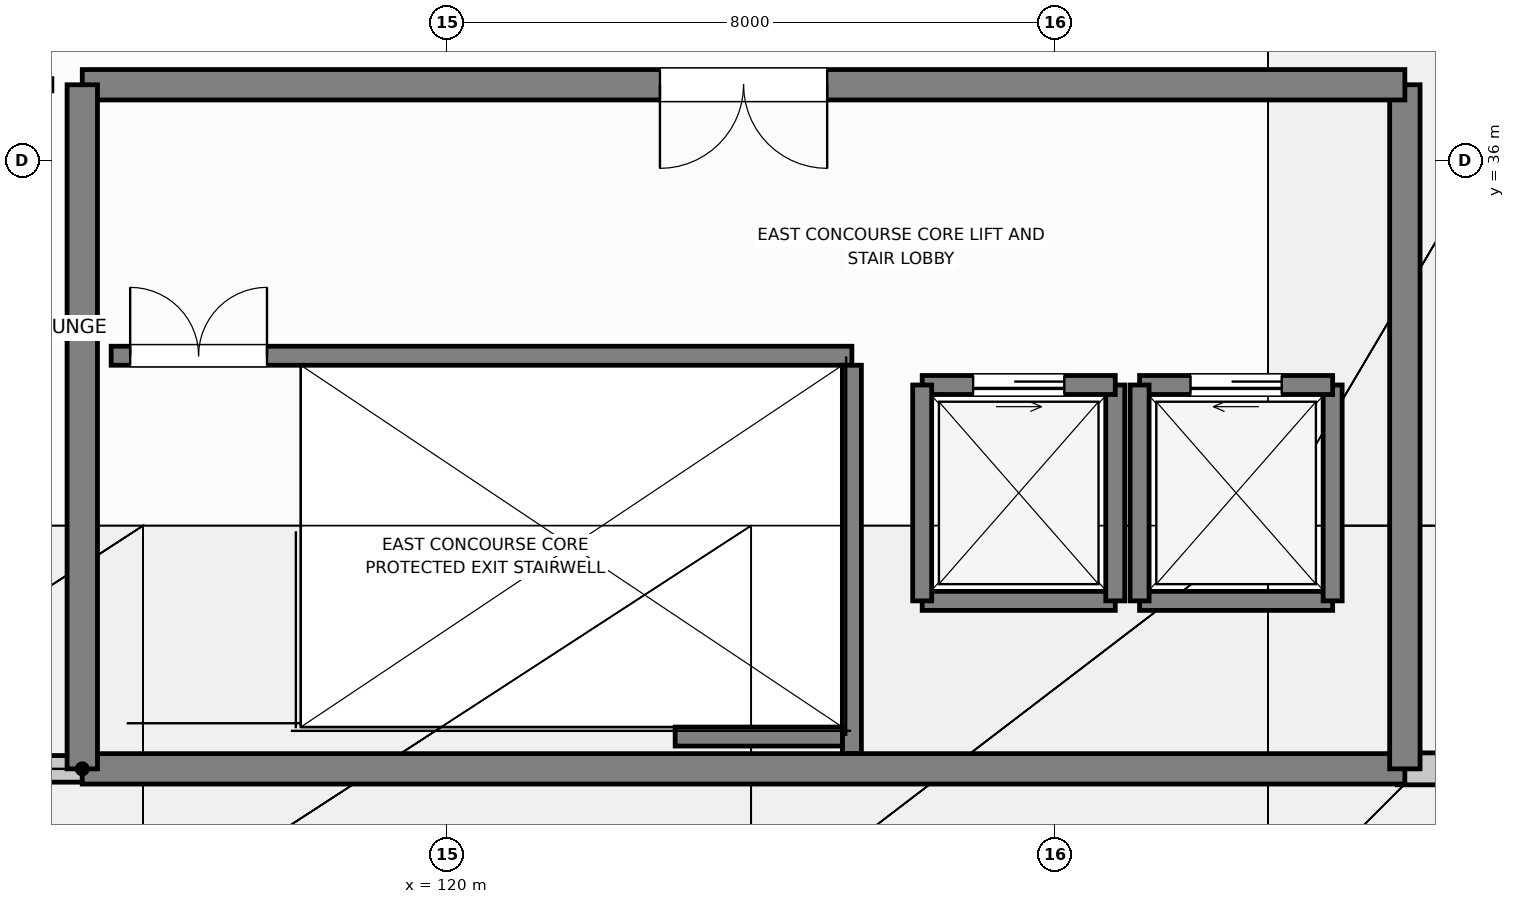
"""IFC4 building model, lengths in metres.
Left out: names, types, materials, properties, quantities, classifications, styles, units other than length and angle.
Written with IfcOpenShell. Run it as: python <this file> out.ifc"""

import sys

from ifc_helpers import new_model, si_unit, direction, frame, frame_2d, origin, place, context, subcontext, project, spatial, rectangle, extrude, element, fill, save


model = new_model("IFC4")
c1 = context("Model", 3, precision=1e-05, world=origin(), true_north=direction((0.0, 1.0)))
c2 = subcontext(c1, "Body", "Model", "MODEL_VIEW")
j1 = project(units=[si_unit("LENGTHUNIT", "METRE"), si_unit("PLANEANGLEUNIT", "RADIAN")], contexts=[c1])
p1 = place(None, origin())
s1 = spatial("IfcSite", under=j1, at=p1, CompositionType="ELEMENT")
p2 = place(p1, origin())
s2 = spatial("IfcBuilding", under=s1, at=p2, CompositionType="ELEMENT")
p3 = place(p2, frame((0.0, 0.0, 11.4)))
s3 = spatial("IfcBuildingStorey", under=s2, at=p3, CompositionType="ELEMENT", Elevation=11.4)
p4 = place(p3, frame((107.5, 28.0, 0.0), z_axis=(0.0, 0.0, 1.0), x_axis=(1.0, 0.0, 0.0)))
e1 = element("IfcWall", 1, at=p4, inside=s3, PredefinedType="STANDARD", context=c2, shape_type="SweptSolid", body=[
    extrude(rectangle(XDim=7.7, YDim=0.35, at=frame_2d((3.85, 0.0))), origin(), (0.0, 0.0, 1.0), 0.95),
])
p5 = place(p3, frame((132.5, 28.0, 0.0), z_axis=(0.0, 0.0, 1.0), x_axis=(1.0, 0.0, 0.0)))
e2 = element("IfcWall", 2, at=p5, inside=s3, PredefinedType="STANDARD", context=c2, shape_type="SweptSolid", body=[
    extrude(rectangle(XDim=1.7, YDim=0.42, at=frame_2d((0.85, 0.0))), origin(), (0.0, 0.0, 1.0), 4.4),
])
p6 = place(p3, frame((126.25, 30.21, 0.0), z_axis=(0.0, 0.0, 1.0), x_axis=(1.0, 0.0, 0.0)))
e3 = element("IfcWall", 3, at=p6, inside=s3, PredefinedType="SOLIDWALL", context=c2, shape_type="SweptSolid", body=[
    extrude(rectangle(XDim=2.54, YDim=0.25, at=frame_2d((1.27, 0.0))), origin(), (0.0, 0.0, 1.0), 4.46),
])
p7 = place(p3, frame((128.79, 30.21, 0.0), z_axis=(0.0, 0.0, 1.0), x_axis=(0.0, 1.0, 0.0)))
e4 = element("IfcWall", 4, at=p7, inside=s3, PredefinedType="SOLIDWALL", context=c2, shape_type="SweptSolid", body=[
    extrude(rectangle(XDim=2.84, YDim=0.25, at=frame_2d((1.42, 0.0))), origin(), (0.0, 0.0, 1.0), 4.46),
])
p8 = place(p3, frame((128.79, 33.05, 0.0), z_axis=(0.0, 0.0, 1.0), x_axis=(-1.0, 0.0, 0.0)))
e5 = element("IfcWall", 5, at=p8, inside=s3, PredefinedType="SOLIDWALL", context=c2, shape_type="SweptSolid", body=[
    extrude(rectangle(XDim=2.54, YDim=0.25, at=frame_2d((1.27, 0.0))), origin(), (0.0, 0.0, 1.0), 4.46),
])
p9 = place(p8, frame((0.67, 0.0, 0.0)))
e6 = element("IfcOpeningElement", 6, at=p9, cuts=e5, PredefinedType="OPENING", context=c2, shape_type="SweptSolid", body=[
    extrude(rectangle(XDim=1.2, YDim=2.2, at=frame_2d((0.6, 1.1))), frame((0.0, 0.135, 0.0), z_axis=(0.0, -1.0, 0.0), x_axis=(1.0, 0.0, 0.0)), (0.0, 0.0, 1.0), 0.27),
])
p10 = place(p3, frame((126.25, 33.05, 0.0), z_axis=(0.0, 0.0, 1.0), x_axis=(0.0, -1.0, 0.0)))
e7 = element("IfcWall", 7, at=p10, inside=s3, PredefinedType="SOLIDWALL", context=c2, shape_type="SweptSolid", body=[
    extrude(rectangle(XDim=2.84, YDim=0.25, at=frame_2d((1.42, 0.0))), origin(), (0.0, 0.0, 1.0), 4.46),
])
p11 = place(p3, frame((129.11, 30.21, 0.0), z_axis=(0.0, 0.0, 1.0), x_axis=(1.0, 0.0, 0.0)))
e8 = element("IfcWall", 8, at=p11, inside=s3, PredefinedType="SOLIDWALL", context=c2, shape_type="SweptSolid", body=[
    extrude(rectangle(XDim=2.54, YDim=0.25, at=frame_2d((1.27, 0.0))), origin(), (0.0, 0.0, 1.0), 4.46),
])
p12 = place(p3, frame((131.65, 30.21, 0.0), z_axis=(0.0, 0.0, 1.0), x_axis=(0.0, 1.0, 0.0)))
e9 = element("IfcWall", 9, at=p12, inside=s3, PredefinedType="SOLIDWALL", context=c2, shape_type="SweptSolid", body=[
    extrude(rectangle(XDim=2.84, YDim=0.25, at=frame_2d((1.42, 0.0))), origin(), (0.0, 0.0, 1.0), 4.46),
])
p13 = place(p3, frame((131.65, 33.05, 0.0), z_axis=(0.0, 0.0, 1.0), x_axis=(-1.0, 0.0, 0.0)))
e10 = element("IfcWall", 10, at=p13, inside=s3, PredefinedType="SOLIDWALL", context=c2, shape_type="SweptSolid", body=[
    extrude(rectangle(XDim=2.54, YDim=0.25, at=frame_2d((1.27, 0.0))), origin(), (0.0, 0.0, 1.0), 4.46),
])
p14 = place(p13, frame((0.67, 0.0, 0.0)))
e11 = element("IfcOpeningElement", 11, at=p14, cuts=e10, PredefinedType="OPENING", context=c2, shape_type="SweptSolid", body=[
    extrude(rectangle(XDim=1.2, YDim=2.2, at=frame_2d((0.6, 1.1))), frame((0.0, 0.135, 0.0), z_axis=(0.0, -1.0, 0.0), x_axis=(1.0, 0.0, 0.0)), (0.0, 0.0, 1.0), 0.27),
])
p15 = place(p3, frame((129.11, 33.05, 0.0), z_axis=(0.0, 0.0, 1.0), x_axis=(0.0, -1.0, 0.0)))
e12 = element("IfcWall", 12, at=p15, inside=s3, PredefinedType="SOLIDWALL", context=c2, shape_type="SweptSolid", body=[
    extrude(rectangle(XDim=2.84, YDim=0.25, at=frame_2d((1.42, 0.0))), origin(), (0.0, 0.0, 1.0), 4.46),
])
p16 = place(p3, frame((115.58, 33.435, 0.0), z_axis=(0.0, 0.0, 1.0), x_axis=(1.0, 0.0, 0.0)))
e13 = element("IfcWall", 13, at=p16, inside=s3, PredefinedType="SOLIDWALL", context=c2, shape_type="SweptSolid", body=[
    extrude(rectangle(XDim=9.745, YDim=0.25, at=frame_2d((4.872, 0.0))), origin(), (0.0, 0.0, 1.0), 4.46),
])
p17 = place(p16, frame((0.25, 0.0, 0.0)))
e14 = element("IfcOpeningElement", 14, at=p17, cuts=e13, PredefinedType="OPENING", context=c2, shape_type="SweptSolid", body=[
    extrude(rectangle(XDim=1.8, YDim=2.25, at=frame_2d((0.9, 1.125))), frame((0.0, 0.135, 0.0), z_axis=(0.0, -1.0, 0.0), x_axis=(1.0, 0.0, 0.0)), (0.0, 0.0, 1.0), 0.27),
])
p18 = place(p3, frame((125.325, 28.2, 0.0), z_axis=(0.0, 0.0, 1.0), x_axis=(0.0, 1.0, 0.0)))
e15 = element("IfcWall", 15, at=p18, inside=s3, PredefinedType="SOLIDWALL", context=c2, shape_type="SweptSolid", body=[
    extrude(rectangle(XDim=5.11, YDim=0.25, at=frame_2d((2.555, 0.0))), origin(), (0.0, 0.0, 1.0), 4.46),
])
p19 = place(p3, frame((123.0, 28.425, 0.0), z_axis=(0.0, 0.0, 1.0), x_axis=(1.0, 0.0, 0.0)))
e16 = element("IfcWall", 16, at=p19, inside=s3, PredefinedType="SOLIDWALL", context=c2, shape_type="SweptSolid", body=[
    extrude(rectangle(XDim=2.2, YDim=0.25, at=frame_2d((1.1, 0.0))), origin(), (0.0, 0.0, 1.0), 4.46),
])
p20 = place(p3, frame((115.2, 28.0, 0.0), z_axis=(0.0, 0.0, 1.0), x_axis=(1.0, 0.0, 0.0)))
e17 = element("IfcWall", 17, at=p20, inside=s3, PredefinedType="SHEAR", context=c2, shape_type="SweptSolid", body=[
    extrude(rectangle(XDim=17.4, YDim=0.4, at=frame_2d((8.7, 0.0))), origin(), (0.0, 0.0, 1.0), 4.46),
])
p21 = place(p3, frame((132.6, 28.0, 0.0), z_axis=(0.0, 0.0, 1.0), x_axis=(0.0, 1.0, 0.0)))
e18 = element("IfcWall", 18, at=p21, inside=s3, PredefinedType="SHEAR", context=c2, shape_type="SweptSolid", body=[
    extrude(rectangle(XDim=9.0, YDim=0.4, at=frame_2d((4.5, 0.0))), origin(), (0.0, 0.0, 1.0), 4.46),
])
p22 = place(p3, frame((132.6, 37.0, 0.0), z_axis=(0.0, 0.0, 1.0), x_axis=(-1.0, 0.0, 0.0)))
e19 = element("IfcWall", 19, at=p22, inside=s3, PredefinedType="SHEAR", context=c2, shape_type="SweptSolid", body=[
    extrude(rectangle(XDim=17.4, YDim=0.4, at=frame_2d((8.7, 0.0))), origin(), (0.0, 0.0, 1.0), 4.46),
])
p23 = place(p22, frame((7.6, 0.0, 0.0)))
e20 = element("IfcOpeningElement", 20, at=p23, cuts=e19, PredefinedType="OPENING", context=c2, shape_type="SweptSolid", body=[
    extrude(rectangle(XDim=2.2, YDim=2.3, at=frame_2d((1.1, 1.15))), frame((0.0, 0.21, 0.0), z_axis=(0.0, -1.0, 0.0), x_axis=(1.0, 0.0, 0.0)), (0.0, 0.0, 1.0), 0.42),
])
p24 = place(p3, frame((115.2, 37.0, 0.0), z_axis=(0.0, 0.0, 1.0), x_axis=(0.0, -1.0, 0.0)))
e21 = element("IfcWall", 21, at=p24, inside=s3, PredefinedType="SHEAR", context=c2, shape_type="SweptSolid", body=[
    extrude(rectangle(XDim=9.0, YDim=0.4, at=frame_2d((4.5, 0.0))), origin(), (0.0, 0.0, 1.0), 4.46),
])
p25 = place(p3, frame((69.2, 37.0, 0.0), z_axis=(0.0, 0.0, 1.0), x_axis=(1.0, 0.0, 0.0)))
e22 = element("IfcWall", 22, at=p25, inside=s3, PredefinedType="PARTITIONING", context=c2, shape_type="SweptSolid", body=[
    extrude(rectangle(XDim=45.6, YDim=0.16, at=frame_2d((22.8, 0.0))), origin(), (0.0, 0.0, 1.0), 4.46),
])
p26 = place(p25, frame((21.9, 0.0, 0.0)))
e23 = element("IfcOpeningElement", 23, at=p26, cuts=e22, PredefinedType="OPENING", context=c2, shape_type="SweptSolid", body=[
    extrude(rectangle(XDim=1.8, YDim=2.25, at=frame_2d((0.9, 1.125))), frame((0.0, 0.09, 0.0), z_axis=(0.0, -1.0, 0.0), x_axis=(1.0, 0.0, 0.0)), (0.0, 0.0, 1.0), 0.18),
])
p27 = place(p9, origin())
e24 = element("IfcDoor", 24, at=p27, inside=s3, OperationType="SLIDING_TO_LEFT", PredefinedType="DOOR", context=c2, shape_type="SweptSolid", body=[
    extrude(rectangle(XDim=1.2, YDim=2.2, at=frame_2d((0.6, 1.1))), frame((0.0, 0.025, 0.0), z_axis=(0.0, -1.0, 0.0), x_axis=(1.0, 0.0, 0.0)), (0.0, 0.0, 1.0), 0.05),
])
fill(e6, e24)
p28 = place(p14, origin())
e25 = element("IfcDoor", 25, at=p28, inside=s3, OperationType="SLIDING_TO_RIGHT", PredefinedType="DOOR", context=c2, shape_type="SweptSolid", body=[
    extrude(rectangle(XDim=1.2, YDim=2.2, at=frame_2d((0.6, 1.1))), frame((0.0, 0.025, 0.0), z_axis=(0.0, -1.0, 0.0), x_axis=(1.0, 0.0, 0.0)), (0.0, 0.0, 1.0), 0.05),
])
fill(e11, e25)
p29 = place(p17, origin())
e26 = element("IfcDoor", 26, at=p29, inside=s3, OperationType="DOUBLE_DOOR_SINGLE_SWING", PredefinedType="DOOR", context=c2, shape_type="SweptSolid", body=[
    extrude(rectangle(XDim=1.8, YDim=2.25, at=frame_2d((0.9, 1.125))), frame((0.0, 0.025, 0.0), z_axis=(0.0, -1.0, 0.0), x_axis=(1.0, 0.0, 0.0)), (0.0, 0.0, 1.0), 0.05),
])
fill(e14, e26)
p30 = place(p23, origin())
e27 = element("IfcDoor", 27, at=p30, inside=s3, OperationType="DOUBLE_DOOR_SINGLE_SWING", PredefinedType="DOOR", context=c2, shape_type="SweptSolid", body=[
    extrude(rectangle(XDim=2.2, YDim=2.3, at=frame_2d((1.1, 1.15))), frame((0.0, 0.025, 0.0), z_axis=(0.0, -1.0, 0.0), x_axis=(1.0, 0.0, 0.0)), (0.0, 0.0, 1.0), 0.05),
])
fill(e20, e27)
save(model, sys.argv[1])
